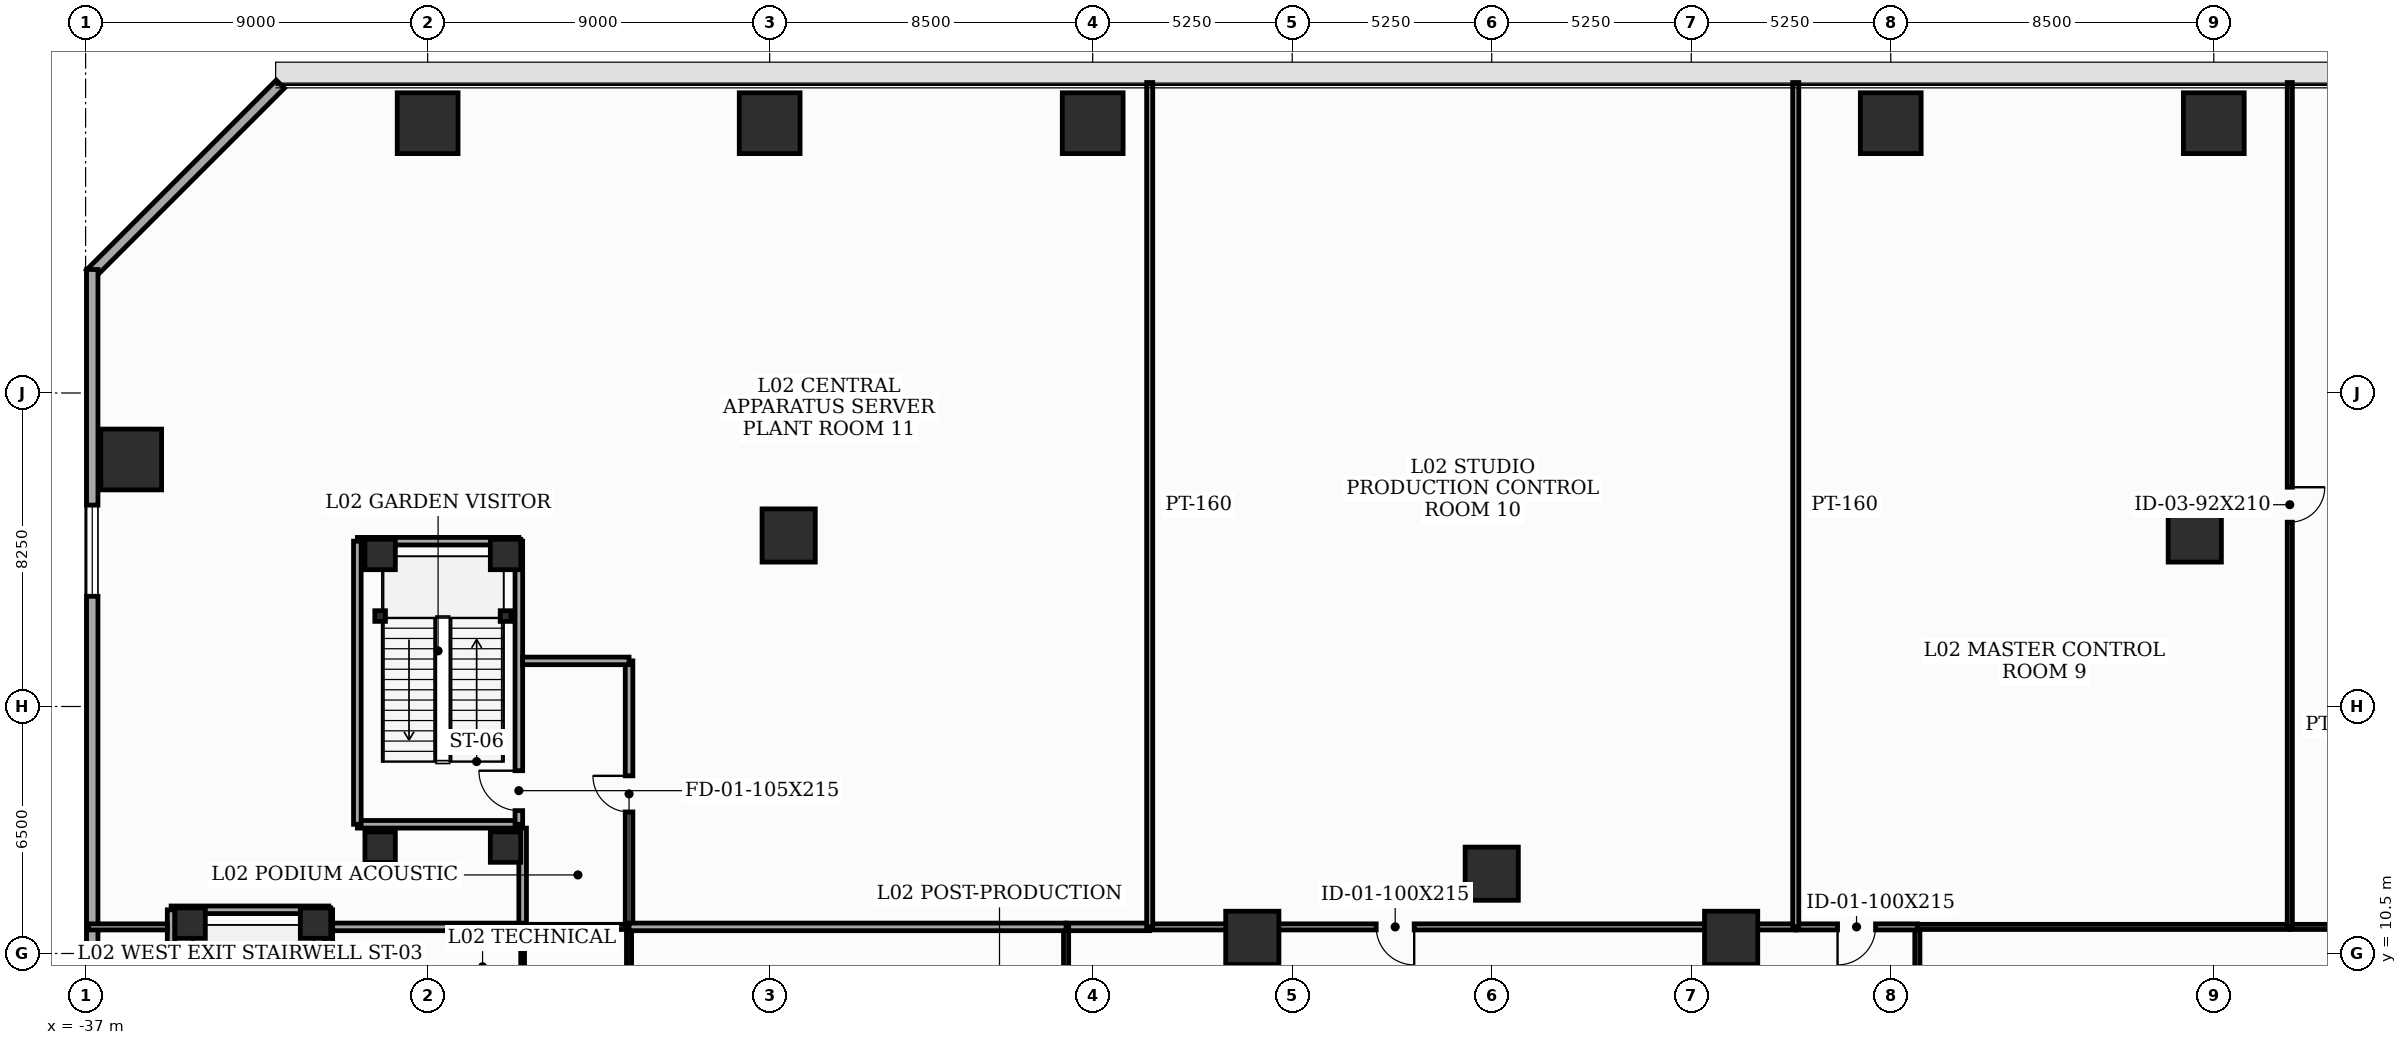
"""IFC4 building model, lengths in metres.
Left out: names, types, materials, properties, quantities, classifications, styles, units other than length and angle.
Written with IfcOpenShell. Run it as: python <this file> out.ifc"""

import sys

from ifc_helpers import new_model, si_unit, direction, frame, frame_2d, origin, origin_2d, place, context, subcontext, project, spatial, rectangle, i_section, extrude, element, fill, save


model = new_model("IFC4")
c1 = context("Model", 3, precision=1e-05, world=origin(), true_north=direction((0.0, 1.0)))
c2 = subcontext(c1, "Body", "Model", "MODEL_VIEW")
j1 = project(units=[si_unit("LENGTHUNIT", "METRE"), si_unit("PLANEANGLEUNIT", "RADIAN")], contexts=[c1])
p1 = place(None, origin())
s1 = spatial("IfcSite", under=j1, at=p1, CompositionType="ELEMENT")
p2 = place(p1, origin())
s2 = spatial("IfcBuilding", under=s1, at=p2, CompositionType="ELEMENT")
p3 = place(p2, frame((0.0, 0.0, 10.4)))
s3 = spatial("IfcBuildingStorey", under=s2, at=p3, CompositionType="ELEMENT", Elevation=10.4)
for number, where, z_axis, x_axis in (
    (1, (6.3, 10.912, 0.0), (0.0, 0.0, 1.0), (1.0, 0.0, 0.0)),
    (2, (0.0, 12.6, 0.0), (0.0, 0.0, 1.0), (1.0, 0.0, 0.0)),
    (3, (-6.3, 10.912, 0.0), (0.0, 0.0, 1.0), (1.0, 0.0, 0.0)),
):
    element("IfcColumn", number, at=place(p3, frame(where, z_axis=z_axis, x_axis=x_axis)), inside=s3, PredefinedType="COLUMN", context=c2, shape_type="SweptSolid", body=[
        extrude(rectangle(XDim=1.4, YDim=1.4, at=origin_2d()), origin(), (0.0, 0.0, 1.0), 5.2),
    ])
for number, where, z_axis, x_axis in (
    (4, (19.0, 32.35, 0.0), (0.0, 0.0, 1.0), (1.0, 0.0, 0.0)),
    (5, (10.5, 32.35, 0.0), (0.0, 0.0, 1.0), (1.0, 0.0, 0.0)),
    (6, (-10.5, 32.35, 0.0), (0.0, 0.0, 1.0), (1.0, 0.0, 0.0)),
    (7, (-19.0, 32.35, 0.0), (0.0, 0.0, 1.0), (1.0, 0.0, 0.0)),
    (8, (-28.0, 32.35, 0.0), (0.0, 0.0, 1.0), (1.0, 0.0, 0.0)),
    (9, (-35.8, 23.5, 0.0), (0.0, 0.0, 1.0), (1.0, 0.0, 0.0)),
):
    element("IfcColumn", number, at=place(p3, frame(where, z_axis=z_axis, x_axis=x_axis)), inside=s3, PredefinedType="COLUMN", context=c2, shape_type="SweptSolid", body=[
        extrude(rectangle(XDim=1.6, YDim=1.6, at=origin_2d()), origin(), (0.0, 0.0, 1.0), 5.2),
    ])
for number, where, z_axis, x_axis in (
    (10, (-18.5, 21.5, 0.0), (0.0, 0.0, 1.0), (1.0, 0.0, 0.0)),
    (11, (18.5, 21.5, 0.0), (0.0, 0.0, 1.0), (1.0, 0.0, 0.0)),
):
    element("IfcColumn", number, at=place(p3, frame(where, z_axis=z_axis, x_axis=x_axis)), inside=s3, PredefinedType="COLUMN", context=c2, shape_type="SweptSolid", body=[
        extrude(rectangle(XDim=1.4, YDim=1.4, at=origin_2d()), origin(), (0.0, 0.0, 1.0), 5.2),
    ])
for number, where, z_axis, x_axis in (
    (12, (-30.95, 11.3, 0.0), (0.0, 0.0, 1.0), (1.0, 0.0, 0.0)),
    (13, (-34.25, 11.3, 0.0), (0.0, 0.0, 1.0), (1.0, 0.0, 0.0)),
    (14, (-29.25, 13.3, 0.0), (0.0, 0.0, 1.0), (1.0, 0.0, 0.0)),
    (15, (-25.95, 13.3, 0.0), (0.0, 0.0, 1.0), (1.0, 0.0, 0.0)),
    (16, (-25.95, 21.0, 0.0), (0.0, 0.0, 1.0), (1.0, 0.0, 0.0)),
    (17, (-29.25, 21.0, 0.0), (0.0, 0.0, 1.0), (1.0, 0.0, 0.0)),
):
    element("IfcColumn", number, at=place(p3, frame(where, z_axis=z_axis, x_axis=x_axis)), inside=s3, PredefinedType="COLUMN", context=c2, shape_type="SweptSolid", body=[
        extrude(rectangle(XDim=0.8, YDim=0.8, at=origin_2d()), origin(), (0.0, 0.0, 1.0), 5.2),
    ])
for number, where, z_axis, x_axis in (
    (18, (-29.25, 19.38, 0.0), (0.0, 0.0, 1.0), (1.0, 0.0, 0.0)),
    (19, (-25.95, 19.38, 0.0), (0.0, 0.0, 1.0), (1.0, 0.0, 0.0)),
):
    element("IfcColumn", number, at=place(p3, frame(where, z_axis=z_axis, x_axis=x_axis)), inside=s3, PredefinedType="PILASTER", context=c2, shape_type="SweptSolid", body=[
        extrude(i_section(OverallWidth=0.28, OverallDepth=0.28, WebThickness=0.01, FlangeThickness=0.018, at=origin_2d()), origin(), (0.0, 0.0, 1.0), 5.2),
    ])
p4 = place(p3, frame((-31.876, 33.376, 0.0), z_axis=(0.0, 0.0, 1.0), x_axis=(-0.707106781187, -0.707106781187, 0.0)))
e20 = element("IfcWall", 20, at=p4, inside=s3, PredefinedType="SOLIDWALL", context=c2, shape_type="SweptSolid", body=[
    extrude(rectangle(XDim=7.071, YDim=0.3, at=frame_2d((3.536, 0.0))), origin(), (0.0, 0.0, 1.0), 4.95),
])
p5 = place(p3, frame((-36.825, 28.5, 0.0), z_axis=(0.0, 0.0, 1.0), x_axis=(0.0, -1.0, 0.0)))
e21 = element("IfcWall", 21, at=p5, inside=s3, PredefinedType="SOLIDWALL", context=c2, shape_type="SweptSolid", body=[
    extrude(rectangle(XDim=48.0, YDim=0.3, at=frame_2d((24.0, 0.0))), origin(), (0.0, 0.0, 1.0), 4.95),
])
p6 = place(p5, frame((6.2, 0.0, 0.9)))
e22 = element("IfcOpeningElement", 22, at=p6, cuts=e21, PredefinedType="OPENING", context=c2, shape_type="SweptSolid", body=[
    extrude(rectangle(XDim=2.4, YDim=1.35, at=frame_2d((1.2, 0.675))), frame((0.0, 0.16, 0.0), z_axis=(0.0, -1.0, 0.0), x_axis=(1.0, 0.0, 0.0)), (0.0, 0.0, 1.0), 0.32),
])
p7 = place(p5, frame((19.2, 0.0, 0.9)))
e23 = element("IfcOpeningElement", 23, at=p7, cuts=e21, PredefinedType="OPENING", context=c2, shape_type="SweptSolid", body=[
    extrude(rectangle(XDim=1.8, YDim=1.35, at=frame_2d((0.9, 0.675))), frame((0.0, 0.16, 0.0), z_axis=(0.0, -1.0, 0.0), x_axis=(1.0, 0.0, 0.0)), (0.0, 0.0, 1.0), 0.32),
])
p8 = place(p5, frame((36.2, 0.0, 0.9)))
e24 = element("IfcOpeningElement", 24, at=p8, cuts=e21, PredefinedType="OPENING", context=c2, shape_type="SweptSolid", body=[
    extrude(rectangle(XDim=2.4, YDim=1.35, at=frame_2d((1.2, 0.675))), frame((0.0, 0.16, 0.0), z_axis=(0.0, -1.0, 0.0), x_axis=(1.0, 0.0, 0.0)), (0.0, 0.0, 1.0), 0.32),
])
p9 = place(p3, frame((-30.6, 4.2, 0.0), z_axis=(0.0, 0.0, 1.0), x_axis=(0.0, 1.0, 0.0)))
e25 = element("IfcWall", 25, at=p9, inside=s3, PredefinedType="SOLIDWALL", context=c2, shape_type="SweptSolid", body=[
    extrude(rectangle(XDim=7.45, YDim=0.2, at=frame_2d((3.725, 0.0))), origin(), (0.0, 0.0, 1.0), 4.95),
])
p10 = place(p9, frame((0.36, 0.0, 0.0)))
e26 = element("IfcOpeningElement", 26, at=p10, cuts=e25, PredefinedType="OPENING", context=c2, shape_type="SweptSolid", body=[
    extrude(rectangle(XDim=1.05, YDim=2.15, at=frame_2d((0.525, 1.075))), frame((0.0, 0.11, 0.0), z_axis=(0.0, -1.0, 0.0), x_axis=(1.0, 0.0, 0.0)), (0.0, 0.0, 1.0), 0.22),
])
p11 = place(p3, frame((-30.6, 11.65, 0.0), z_axis=(0.0, 0.0, 1.0), x_axis=(-1.0, 0.0, 0.0)))
e27 = element("IfcWall", 27, at=p11, inside=s3, PredefinedType="SOLIDWALL", context=c2, shape_type="SweptSolid", body=[
    extrude(rectangle(XDim=4.15, YDim=0.2, at=frame_2d((2.075, 0.0))), origin(), (0.0, 0.0, 1.0), 4.95),
])
p12 = place(p3, frame((-34.75, 11.65, 0.0), z_axis=(0.0, 0.0, 1.0), x_axis=(0.0, -1.0, 0.0)))
e28 = element("IfcWall", 28, at=p12, inside=s3, PredefinedType="SOLIDWALL", context=c2, shape_type="SweptSolid", body=[
    extrude(rectangle(XDim=7.45, YDim=0.2, at=frame_2d((3.725, 0.0))), origin(), (0.0, 0.0, 1.0), 4.95),
])
p13 = place(p3, frame((-29.85, 13.9, 0.0), z_axis=(0.0, 0.0, 1.0), x_axis=(1.0, 0.0, 0.0)))
e29 = element("IfcWall", 29, at=p13, inside=s3, PredefinedType="SOLIDWALL", context=c2, shape_type="SweptSolid", body=[
    extrude(rectangle(XDim=4.25, YDim=0.2, at=frame_2d((2.125, 0.0))), origin(), (0.0, 0.0, 1.0), 4.435),
])
p14 = place(p3, frame((-25.6, 13.9, 0.0), z_axis=(0.0, 0.0, 1.0), x_axis=(0.0, 1.0, 0.0)))
e30 = element("IfcWall", 30, at=p14, inside=s3, PredefinedType="SOLIDWALL", context=c2, shape_type="SweptSolid", body=[
    extrude(rectangle(XDim=7.45, YDim=0.2, at=frame_2d((3.725, 0.0))), origin(), (0.0, 0.0, 1.0), 4.435),
])
p15 = place(p14, frame((0.36, 0.0, 0.0)))
e31 = element("IfcOpeningElement", 31, at=p15, cuts=e30, PredefinedType="OPENING", context=c2, shape_type="SweptSolid", body=[
    extrude(rectangle(XDim=1.05, YDim=2.15, at=frame_2d((0.525, 1.075))), frame((0.0, 0.11, 0.0), z_axis=(0.0, -1.0, 0.0), x_axis=(1.0, 0.0, 0.0)), (0.0, 0.0, 1.0), 0.22),
])
p16 = place(p3, frame((-25.6, 21.35, 0.0), z_axis=(0.0, 0.0, 1.0), x_axis=(-1.0, 0.0, 0.0)))
e32 = element("IfcWall", 32, at=p16, inside=s3, PredefinedType="SOLIDWALL", context=c2, shape_type="SweptSolid", body=[
    extrude(rectangle(XDim=4.25, YDim=0.2, at=frame_2d((2.125, 0.0))), origin(), (0.0, 0.0, 1.0), 4.95),
])
p17 = place(p3, frame((-29.85, 21.35, 0.0), z_axis=(0.0, 0.0, 1.0), x_axis=(0.0, -1.0, 0.0)))
e33 = element("IfcWall", 33, at=p17, inside=s3, PredefinedType="SOLIDWALL", context=c2, shape_type="SweptSolid", body=[
    extrude(rectangle(XDim=7.45, YDim=0.2, at=frame_2d((3.725, 0.0))), origin(), (0.0, 0.0, 1.0), 4.435),
])
for number, where, z_axis, x_axis in (
    (34, (-22.7, 11.2, 0.0), (0.0, 0.0, 1.0), (-1.0, 0.0, 0.0)),
    (35, (11.2, 8.4, 0.0), (0.0, 0.0, 1.0), (0.0, 1.0, 0.0)),
):
    element("IfcWall", number, at=place(p3, frame(where, z_axis=z_axis, x_axis=x_axis)), inside=s3, PredefinedType="PARTITIONING", context=c2, shape_type="SweptSolid", body=[
        extrude(rectangle(XDim=2.8, YDim=0.135, at=frame_2d((1.4, 0.0))), origin(), (0.0, 0.0, 1.0), 4.95),
    ])
p18 = place(p3, frame((11.2, 11.2, 0.0), z_axis=(0.0, 0.0, 1.0), x_axis=(-1.0, 0.0, 0.0)))
e36 = element("IfcWall", 36, at=p18, inside=s3, PredefinedType="PARTITIONING", context=c2, shape_type="SweptSolid", body=[
    extrude(rectangle(XDim=3.2, YDim=0.16, at=frame_2d((1.6, 0.0))), origin(), (0.0, 0.0, 1.0), 4.95),
])
p19 = place(p18, frame((1.1, 0.0, 0.0)))
e37 = element("IfcOpeningElement", 37, at=p19, cuts=e36, PredefinedType="OPENING", context=c2, shape_type="SweptSolid", body=[
    extrude(rectangle(XDim=1.0, YDim=2.15, at=frame_2d((0.5, 1.075))), frame((0.0, 0.09, 0.0), z_axis=(0.0, -1.0, 0.0), x_axis=(1.0, 0.0, 0.0)), (0.0, 0.0, 1.0), 0.18),
])
p20 = place(p3, frame((8.0, 11.2, 0.0), z_axis=(0.0, 0.0, 1.0), x_axis=(-1.0, 0.0, 0.0)))
e38 = element("IfcWall", 38, at=p20, inside=s3, PredefinedType="PARTITIONING", context=c2, shape_type="SweptSolid", body=[
    extrude(rectangle(XDim=17.0, YDim=0.16, at=frame_2d((8.5, 0.0))), origin(), (0.0, 0.0, 1.0), 3.435),
])
p21 = place(p20, frame((10.04, 0.0, 0.0)))
e39 = element("IfcOpeningElement", 39, at=p21, cuts=e38, PredefinedType="OPENING", context=c2, shape_type="SweptSolid", body=[
    extrude(rectangle(XDim=1.0, YDim=2.15, at=frame_2d((0.5, 1.075))), frame((0.0, 0.09, 0.0), z_axis=(0.0, -1.0, 0.0), x_axis=(1.0, 0.0, 0.0)), (0.0, 0.0, 1.0), 0.18),
])
p22 = place(p3, frame((-9.0, 11.2, 0.0), z_axis=(0.0, 0.0, 1.0), x_axis=(-1.0, 0.0, 0.0)))
e40 = element("IfcWall", 40, at=p22, inside=s3, PredefinedType="SOLIDWALL", context=c2, shape_type="SweptSolid", body=[
    extrude(rectangle(XDim=2.2, YDim=0.2, at=frame_2d((1.1, 0.0))), origin(), (0.0, 0.0, 1.0), 4.95),
])
for number, where, z_axis, x_axis in (
    (41, (-11.2, 11.2, 0.0), (0.0, 0.0, 1.0), (0.0, -1.0, 0.0)),
    (42, (-22.7, 8.4, 0.0), (0.0, 0.0, 1.0), (0.0, 1.0, 0.0)),
):
    element("IfcWall", number, at=place(p3, frame(where, z_axis=z_axis, x_axis=x_axis)), inside=s3, PredefinedType="PARTITIONING", context=c2, shape_type="SweptSolid", body=[
        extrude(rectangle(XDim=2.8, YDim=0.135, at=frame_2d((1.4, 0.0))), origin(), (0.0, 0.0, 1.0), 4.95),
    ])
p23 = place(p3, frame((-25.5, 11.2, 0.0), z_axis=(0.0, 0.0, 1.0), x_axis=(0.0, -1.0, 0.0)))
e43 = element("IfcWall", 43, at=p23, inside=s3, PredefinedType="MOVABLE", context=c2, shape_type="SweptSolid", body=[
    extrude(rectangle(XDim=2.8, YDim=0.1, at=frame_2d((1.4, 0.0))), origin(), (0.0, 0.0, 1.0), 4.95),
])
p24 = place(p3, frame((-25.5, 13.8, 0.0), z_axis=(0.0, 0.0, 1.0), x_axis=(0.0, -1.0, 0.0)))
e44 = element("IfcWall", 44, at=p24, inside=s3, PredefinedType="SOLIDWALL", context=c2, shape_type="SweptSolid", body=[
    extrude(rectangle(XDim=2.6, YDim=0.2, at=frame_2d((1.3, 0.0))), origin(), (0.0, 0.0, 1.0), 4.435),
])
p25 = place(p3, frame((-22.7, 11.2, 0.0), z_axis=(0.0, 0.0, 1.0), x_axis=(0.0, 1.0, 0.0)))
e45 = element("IfcWall", 45, at=p25, inside=s3, PredefinedType="SOLIDWALL", context=c2, shape_type="SweptSolid", body=[
    extrude(rectangle(XDim=7.0, YDim=0.2, at=frame_2d((3.5, 0.0))), origin(), (0.0, 0.0, 1.0), 4.435),
])
p26 = place(p25, frame((3.025, 0.0, 0.0)))
e46 = element("IfcOpeningElement", 46, at=p26, cuts=e45, PredefinedType="OPENING", context=c2, shape_type="SweptSolid", body=[
    extrude(rectangle(XDim=0.95, YDim=2.1, at=frame_2d((0.475, 1.05))), frame((0.0, 0.11, 0.0), z_axis=(0.0, -1.0, 0.0), x_axis=(1.0, 0.0, 0.0)), (0.0, 0.0, 1.0), 0.22),
])
p27 = place(p3, frame((-22.7, 18.2, 0.0), z_axis=(0.0, 0.0, 1.0), x_axis=(-1.0, 0.0, 0.0)))
e47 = element("IfcWall", 47, at=p27, inside=s3, PredefinedType="SOLIDWALL", context=c2, shape_type="SweptSolid", body=[
    extrude(rectangle(XDim=2.8, YDim=0.2, at=frame_2d((1.4, 0.0))), origin(), (0.0, 0.0, 1.0), 4.95),
])
p28 = place(p3, frame((-34.85, 11.2, 0.0), z_axis=(0.0, 0.0, 1.0), x_axis=(-1.0, 0.0, 0.0)))
e48 = element("IfcWall", 48, at=p28, inside=s3, PredefinedType="PARTITIONING", context=c2, shape_type="SweptSolid", body=[
    extrude(rectangle(XDim=2.07, YDim=0.16, at=frame_2d((1.035, 0.0))), origin(), (0.0, 0.0, 1.0), 4.235),
])
p29 = place(p3, frame((30.5, 11.2, 0.0), z_axis=(0.0, 0.0, 1.0), x_axis=(-1.0, 0.0, 0.0)))
e49 = element("IfcWall", 49, at=p29, inside=s3, PredefinedType="PARTITIONING", context=c2, shape_type="SweptSolid", body=[
    extrude(rectangle(XDim=9.5, YDim=0.135, at=frame_2d((4.75, 0.0))), origin(), (0.0, 0.0, 1.0), 4.95),
])
p30 = place(p3, frame((21.0, 11.2, 0.0), z_axis=(0.0, 0.0, 1.0), x_axis=(-1.0, 0.0, 0.0)))
e50 = element("IfcWall", 50, at=p30, inside=s3, PredefinedType="PARTITIONING", context=c2, shape_type="SweptSolid", body=[
    extrude(rectangle(XDim=9.8, YDim=0.135, at=frame_2d((4.9, 0.0))), origin(), (0.0, 0.0, 1.0), 4.235),
])
p31 = place(p3, frame((21.0, 33.42, 0.0), z_axis=(0.0, 0.0, 1.0), x_axis=(0.0, -1.0, 0.0)))
e51 = element("IfcWall", 51, at=p31, inside=s3, PredefinedType="PARTITIONING", context=c2, shape_type="SweptSolid", body=[
    extrude(rectangle(XDim=22.22, YDim=0.135, at=frame_2d((11.11, 0.0))), origin(), (0.0, 0.0, 1.0), 3.435),
])
p32 = place(p31, frame((10.65, 0.0, 0.0)))
e52 = element("IfcOpeningElement", 52, at=p32, cuts=e51, PredefinedType="OPENING", context=c2, shape_type="SweptSolid", body=[
    extrude(rectangle(XDim=0.92, YDim=2.1, at=frame_2d((0.46, 1.05))), frame((0.0, 0.077, 0.0), z_axis=(0.0, -1.0, 0.0), x_axis=(1.0, 0.0, 0.0)), (0.0, 0.0, 1.0), 0.155),
])
for number, where, z_axis, x_axis in (
    (53, (8.0, 33.42, 0.0), (0.0, 0.0, 1.0), (0.0, -1.0, 0.0)),
    (54, (-9.0, 33.42, 0.0), (0.0, 0.0, 1.0), (0.0, -1.0, 0.0)),
):
    element("IfcWall", number, at=place(p3, frame(where, z_axis=z_axis, x_axis=x_axis)), inside=s3, PredefinedType="PARTITIONING", context=c2, shape_type="SweptSolid", body=[
        extrude(rectangle(XDim=22.22, YDim=0.16, at=frame_2d((11.11, 0.0))), origin(), (0.0, 0.0, 1.0), 3.435),
    ])
p33 = place(p3, frame((-22.7, 11.2, 0.0), z_axis=(0.0, 0.0, 1.0), x_axis=(1.0, 0.0, 0.0)))
e55 = element("IfcWall", 55, at=p33, inside=s3, PredefinedType="SOLIDWALL", context=c2, shape_type="SweptSolid", body=[
    extrude(rectangle(XDim=11.5, YDim=0.2, at=frame_2d((5.75, 0.0))), origin(), (0.0, 0.0, 1.0), 4.235),
])
p34 = place(p3, frame((-30.5, 11.2, 0.0), z_axis=(0.0, 0.0, 1.0), x_axis=(1.0, 0.0, 0.0)))
e56 = element("IfcWall", 56, at=p34, inside=s3, PredefinedType="SOLIDWALL", context=c2, shape_type="SweptSolid", body=[
    extrude(rectangle(XDim=5.0, YDim=0.2, at=frame_2d((2.5, 0.0))), origin(), (0.0, 0.0, 1.0), 4.95),
])
p35 = place(p6, origin())
e57 = element("IfcWindow", 57, at=p35, inside=s3, PartitioningType="SINGLE_PANEL", PredefinedType="WINDOW", context=c2, shape_type="SweptSolid", body=[
    extrude(rectangle(XDim=2.4, YDim=1.35, at=frame_2d((1.2, 0.675))), frame((0.0, 0.03, 0.0), z_axis=(0.0, -1.0, 0.0), x_axis=(1.0, 0.0, 0.0)), (0.0, 0.0, 1.0), 0.06),
])
fill(e22, e57)
p36 = place(p15, origin())
e58 = element("IfcDoor", 58, at=p36, inside=s3, OperationType="SINGLE_SWING_RIGHT", PredefinedType="DOOR", context=c2, shape_type="SweptSolid", body=[
    extrude(rectangle(XDim=1.05, YDim=2.15, at=frame_2d((0.525, 1.075))), frame((0.0, 0.025, 0.0), z_axis=(0.0, -1.0, 0.0), x_axis=(1.0, 0.0, 0.0)), (0.0, 0.0, 1.0), 0.05),
])
fill(e31, e58)
p37 = place(p19, origin())
e59 = element("IfcDoor", 59, at=p37, inside=s3, OperationType="SINGLE_SWING_RIGHT", PredefinedType="DOOR", context=c2, shape_type="SweptSolid", body=[
    extrude(rectangle(XDim=1.0, YDim=2.15, at=frame_2d((0.5, 1.075))), frame((0.0, 0.025, 0.0), z_axis=(0.0, -1.0, 0.0), x_axis=(1.0, 0.0, 0.0)), (0.0, 0.0, 1.0), 0.05),
])
fill(e37, e59)
p38 = place(p21, origin())
e60 = element("IfcDoor", 60, at=p38, inside=s3, OperationType="SINGLE_SWING_LEFT", PredefinedType="DOOR", context=c2, shape_type="SweptSolid", body=[
    extrude(rectangle(XDim=1.0, YDim=2.15, at=frame_2d((0.5, 1.075))), frame((0.0, 0.025, 0.0), z_axis=(0.0, -1.0, 0.0), x_axis=(1.0, 0.0, 0.0)), (0.0, 0.0, 1.0), 0.05),
])
fill(e39, e60)
p39 = place(p26, origin())
e61 = element("IfcDoor", 61, at=p39, inside=s3, OperationType="SINGLE_SWING_RIGHT", PredefinedType="DOOR", context=c2, shape_type="SweptSolid", body=[
    extrude(rectangle(XDim=0.95, YDim=2.1, at=frame_2d((0.475, 1.05))), frame((0.0, 0.025, 0.0), z_axis=(0.0, -1.0, 0.0), x_axis=(1.0, 0.0, 0.0)), (0.0, 0.0, 1.0), 0.05),
])
fill(e46, e61)
p40 = place(p32, origin())
e62 = element("IfcDoor", 62, at=p40, inside=s3, OperationType="SINGLE_SWING_LEFT", PredefinedType="DOOR", context=c2, shape_type="SweptSolid", body=[
    extrude(rectangle(XDim=0.92, YDim=2.1, at=frame_2d((0.46, 1.05))), frame((0.0, 0.025, 0.0), z_axis=(0.0, -1.0, 0.0), x_axis=(1.0, 0.0, 0.0)), (0.0, 0.0, 1.0), 0.05),
])
fill(e52, e62)
save(model, sys.argv[1])
